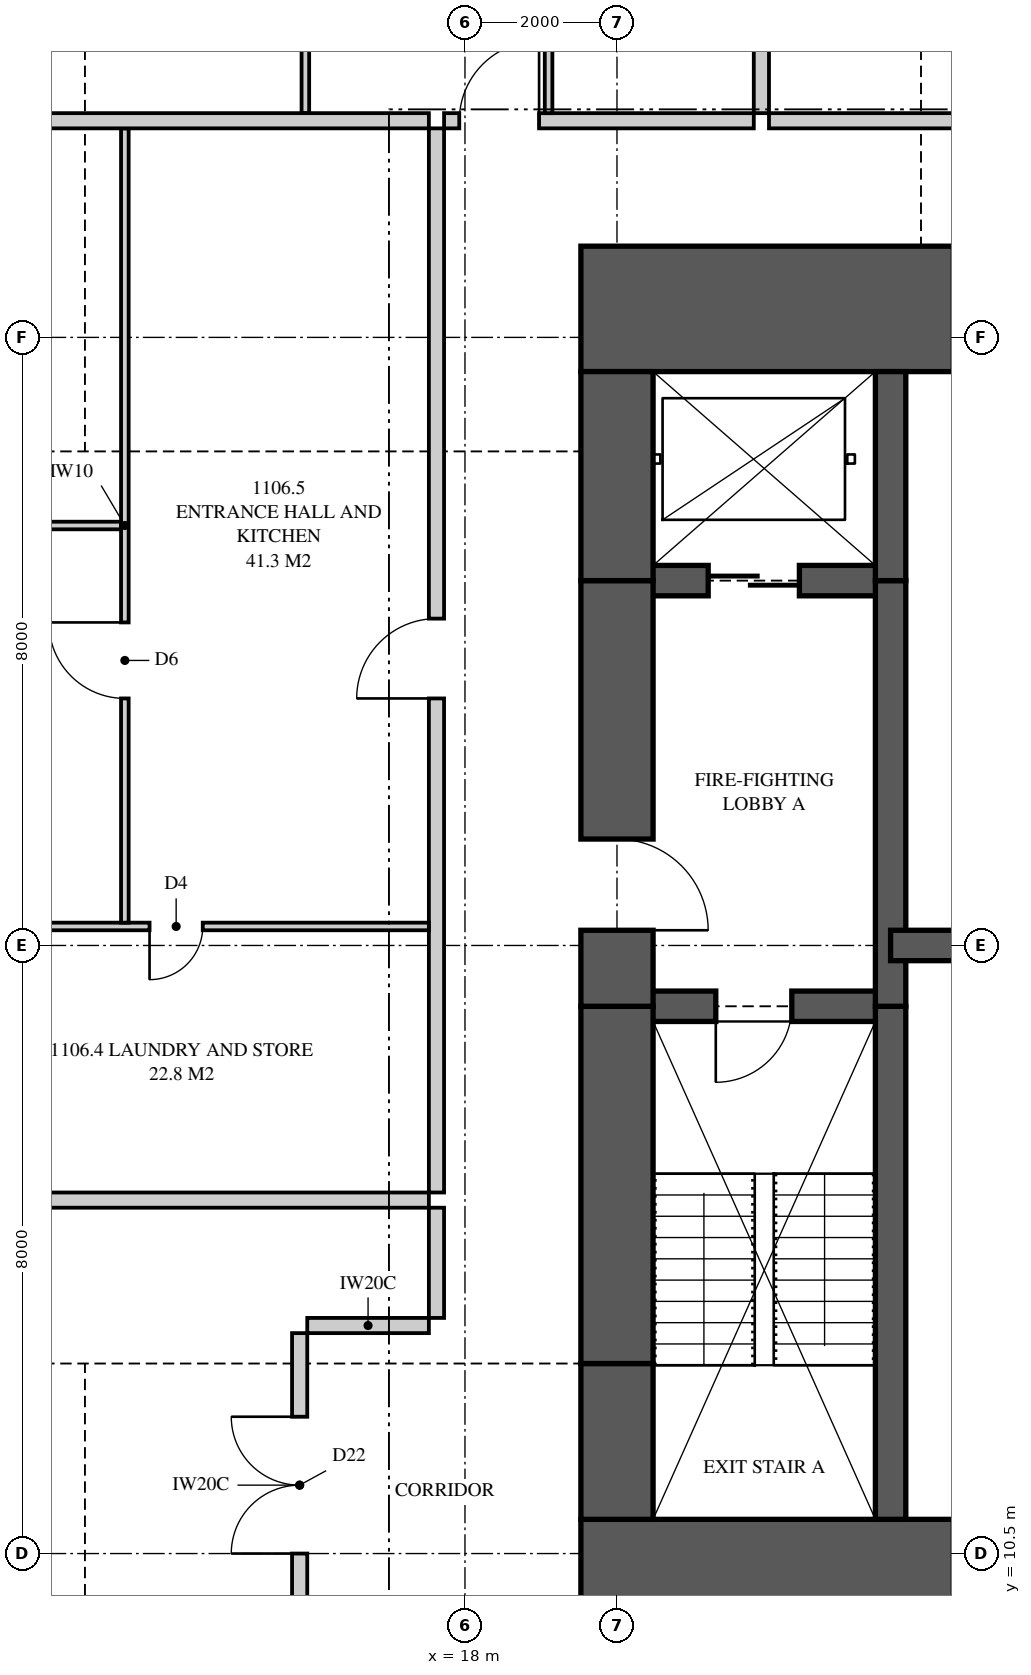
"""IFC4 building model, lengths in metres.
Left out: names, types, materials, properties, quantities, classifications, styles, units other than length and angle.
Written with IfcOpenShell. Run it as: python <this file> out.ifc"""

import sys

from ifc_helpers import new_model, si_unit, direction, frame, frame_2d, origin, place, context, subcontext, project, spatial, polyline, rectangle, outline, extrude, element, fill, save


model = new_model("IFC4")
c1 = context("Model", 3, precision=1e-05, world=origin(), true_north=direction((0.0, 1.0)))
c2 = subcontext(c1, "Body", "Model", "MODEL_VIEW")
j1 = project(units=[si_unit("LENGTHUNIT", "METRE"), si_unit("PLANEANGLEUNIT", "RADIAN")], contexts=[c1])
p1 = place(None, origin())
s1 = spatial("IfcSite", under=j1, at=p1, CompositionType="ELEMENT")
p2 = place(p1, origin())
s2 = spatial("IfcBuilding", under=s1, at=p2, CompositionType="ELEMENT")
p3 = place(p2, frame((0.0, 0.0, 44.45)))
s3 = spatial("IfcBuildingStorey", under=s2, at=p3, CompositionType="ELEMENT", Elevation=44.45)
p4 = place(p3, frame((19.525, 10.125, 0.0), z_axis=(0.0, 0.0, 1.0), x_axis=(1.0, 0.0, 0.0)))
e1 = element("IfcWall", 1, at=p4, inside=s3, PredefinedType="SHEAR", context=c2, shape_type="SweptSolid", body=[
    extrude(rectangle(XDim=6.475, YDim=1.65, at=frame_2d((3.238, 0.0))), origin(), (0.0, 0.0, 1.0), 3.35),
])
p5 = place(p4, frame((4.9, 0.0, 0.0)))
e2 = element("IfcOpeningElement", 2, at=p5, cuts=e1, PredefinedType="OPENING", context=c2, shape_type="SweptSolid", body=[
    extrude(rectangle(XDim=0.75, YDim=2.1, at=frame_2d((0.375, 1.05))), frame((0.0, 0.835, 0.0), z_axis=(0.0, -1.0, 0.0), x_axis=(1.0, 0.0, 0.0)), (0.0, 0.0, 1.0), 1.67),
])
p6 = place(p3, frame((26.0, 26.875, 0.0), z_axis=(0.0, 0.0, 1.0), x_axis=(-1.0, 0.0, 0.0)))
e3 = element("IfcWall", 3, at=p6, inside=s3, PredefinedType="SHEAR", context=c2, shape_type="SweptSolid", body=[
    extrude(rectangle(XDim=6.475, YDim=1.65, at=frame_2d((3.238, 0.0))), origin(), (0.0, 0.0, 1.0), 3.35),
])
p7 = place(p6, frame((0.825, 0.0, 0.0)))
e4 = element("IfcOpeningElement", 4, at=p7, cuts=e3, PredefinedType="OPENING", context=c2, shape_type="SweptSolid", body=[
    extrude(rectangle(XDim=0.75, YDim=2.1, at=frame_2d((0.375, 1.05))), frame((0.0, 0.835, 0.0), z_axis=(0.0, -1.0, 0.0), x_axis=(1.0, 0.0, 0.0)), (0.0, 0.0, 1.0), 1.67),
])
p8 = place(p3, frame((20.0, 26.05, 0.0), z_axis=(0.0, 0.0, 1.0), x_axis=(0.0, -1.0, 0.0)))
e5 = element("IfcWall", 5, at=p8, inside=s3, PredefinedType="SHEAR", context=c2, shape_type="SweptSolid", body=[
    extrude(rectangle(XDim=2.75, YDim=0.95, at=frame_2d((1.375, 0.0))), origin(), (0.0, 0.0, 1.0), 3.35),
])
p9 = place(p3, frame((20.0, 23.3, 0.0), z_axis=(0.0, 0.0, 1.0), x_axis=(0.0, -1.0, 0.0)))
e6 = element("IfcWall", 6, at=p9, inside=s3, PredefinedType="SHEAR", context=c2, shape_type="SweptSolid", body=[
    extrude(rectangle(XDim=5.6, YDim=0.95, at=frame_2d((2.8, 0.0))), origin(), (0.0, 0.0, 1.0), 3.35),
])
p10 = place(p9, frame((3.4, 0.0, 0.0)))
e7 = element("IfcOpeningElement", 7, at=p10, cuts=e6, PredefinedType="OPENING", context=c2, shape_type="SweptSolid", body=[
    extrude(rectangle(XDim=1.2, YDim=2.2, at=frame_2d((0.6, 1.1))), frame((0.0, 0.485, 0.0), z_axis=(0.0, -1.0, 0.0), x_axis=(1.0, 0.0, 0.0)), (0.0, 0.0, 1.0), 0.97),
])
p11 = place(p3, frame((20.0, 17.7, 0.0), z_axis=(0.0, 0.0, 1.0), x_axis=(0.0, -1.0, 0.0)))
e8 = element("IfcWall", 8, at=p11, inside=s3, PredefinedType="SHEAR", context=c2, shape_type="SweptSolid", body=[
    extrude(rectangle(XDim=4.7, YDim=0.95, at=frame_2d((2.35, 0.0))), origin(), (0.0, 0.0, 1.0), 3.35),
])
p12 = place(p3, frame((20.0, 13.0, 0.0), z_axis=(0.0, 0.0, 1.0), x_axis=(0.0, -1.0, 0.0)))
e9 = element("IfcWall", 9, at=p12, inside=s3, PredefinedType="SHEAR", context=c2, shape_type="SweptSolid", body=[
    extrude(rectangle(XDim=2.05, YDim=0.95, at=frame_2d((1.025, 0.0))), origin(), (0.0, 0.0, 1.0), 3.35),
])
p13 = place(p3, frame((23.6, 10.95, 0.0), z_axis=(0.0, 0.0, 1.0), x_axis=(0.0, 1.0, 0.0)))
e10 = element("IfcWall", 10, at=p13, inside=s3, PredefinedType="SHEAR", context=c2, shape_type="SweptSolid", body=[
    extrude(rectangle(XDim=6.75, YDim=0.4, at=frame_2d((3.375, 0.0))), origin(), (0.0, 0.0, 1.0), 3.35),
])
p14 = place(p3, frame((23.6, 17.7, 0.0), z_axis=(0.0, 0.0, 1.0), x_axis=(0.0, 1.0, 0.0)))
e11 = element("IfcWall", 11, at=p14, inside=s3, PredefinedType="SHEAR", context=c2, shape_type="SweptSolid", body=[
    extrude(rectangle(XDim=5.6, YDim=0.4, at=frame_2d((2.8, 0.0))), origin(), (0.0, 0.0, 1.0), 3.35),
])
p15 = place(p3, frame((23.6, 23.3, 0.0), z_axis=(0.0, 0.0, 1.0), x_axis=(0.0, 1.0, 0.0)))
e12 = element("IfcWall", 12, at=p15, inside=s3, PredefinedType="SHEAR", context=c2, shape_type="SweptSolid", body=[
    extrude(rectangle(XDim=2.75, YDim=0.4, at=frame_2d((1.375, 0.0))), origin(), (0.0, 0.0, 1.0), 3.35),
])
p16 = place(p3, frame((20.0, 17.7, 0.0), z_axis=(0.0, 0.0, 1.0), x_axis=(1.0, 0.0, 0.0)))
e13 = element("IfcWall", 13, at=p16, inside=s3, PredefinedType="SHEAR", context=c2, shape_type="SweptSolid", body=[
    extrude(rectangle(XDim=3.6, YDim=0.4, at=frame_2d((1.8, 0.0))), origin(), (0.0, 0.0, 1.0), 3.35),
])
p17 = place(p16, frame((1.3, 0.0, 0.0)))
e14 = element("IfcOpeningElement", 14, at=p17, cuts=e13, PredefinedType="OPENING", context=c2, shape_type="SweptSolid", body=[
    extrude(rectangle(XDim=1.0, YDim=2.1, at=frame_2d((0.5, 1.05))), frame((0.0, 0.21, 0.0), z_axis=(0.0, -1.0, 0.0), x_axis=(1.0, 0.0, 0.0)), (0.0, 0.0, 1.0), 0.42),
])
p18 = place(p3, frame((20.0, 23.3, 0.0), z_axis=(0.0, 0.0, 1.0), x_axis=(1.0, 0.0, 0.0)))
e15 = element("IfcWall", 15, at=p18, inside=s3, PredefinedType="SHEAR", context=c2, shape_type="SweptSolid", body=[
    extrude(rectangle(XDim=3.6, YDim=0.4, at=frame_2d((1.8, 0.0))), origin(), (0.0, 0.0, 1.0), 3.35),
])
p19 = place(p18, frame((1.2, 0.0, 0.0)))
e16 = element("IfcOpeningElement", 16, at=p19, cuts=e15, PredefinedType="OPENING", context=c2, shape_type="SweptSolid", body=[
    extrude(rectangle(XDim=1.2, YDim=2.1, at=frame_2d((0.6, 1.05))), frame((0.0, 0.21, 0.0), z_axis=(0.0, -1.0, 0.0), x_axis=(1.0, 0.0, 0.0)), (0.0, 0.0, 1.0), 0.42),
])
p20 = place(p3, frame((23.6, 18.5, 0.0), z_axis=(0.0, 0.0, 1.0), x_axis=(1.0, 0.0, 0.0)))
e17 = element("IfcWall", 17, at=p20, inside=s3, PredefinedType="SHEAR", context=c2, shape_type="SweptSolid", body=[
    extrude(rectangle(XDim=2.4, YDim=0.4, at=frame_2d((1.2, 0.0))), origin(), (0.0, 0.0, 1.0), 3.35),
])
p21 = place(p3, frame((21.9, 37.825, 0.0), z_axis=(0.0, 0.0, 1.0), x_axis=(0.0, -1.0, 0.0)))
e18 = element("IfcWall", 18, at=p21, inside=s3, PredefinedType="PARTITIONING", context=c2, shape_type="SweptSolid", body=[
    extrude(outline(polyline([(0.529, 2.15), (0.0, 2.15), (0.0, 0.0), (0.529, 0.0), (0.529, 0.056), (1.021, 0.056), (1.021, 0.0), (8.375, 0.0), (8.375, 3.11), (1.685, 3.11), (1.685, 2.15), (1.021, 2.15), (1.021, 2.094), (0.529, 2.094), (0.529, 2.15)])), frame((0.0, 0.1, 0.0), z_axis=(0.0, -1.0, 0.0), x_axis=(1.0, 0.0, 0.0)), (0.0, 0.0, 1.0), 0.2),
])
p22 = place(p3, frame((17.725, 29.35, 0.0), z_axis=(0.0, 0.0, 1.0), x_axis=(1.0, 0.0, 0.0)))
e19 = element("IfcWall", 19, at=p22, inside=s3, PredefinedType="PARTITIONING", context=c2, shape_type="SweptSolid", body=[
    extrude(rectangle(XDim=4.075, YDim=0.2, at=frame_2d((2.038, 0.0))), origin(), (0.0, 0.0, 1.0), 3.11),
])
p23 = place(p22, frame((0.2, 0.0, 0.0)))
e20 = element("IfcOpeningElement", 20, at=p23, cuts=e19, PredefinedType="OPENING", context=c2, shape_type="SweptSolid", body=[
    extrude(rectangle(XDim=1.05, YDim=2.2, at=frame_2d((0.525, 1.1))), frame((0.0, 0.11, 0.0), z_axis=(0.0, -1.0, 0.0), x_axis=(1.0, 0.0, 0.0)), (0.0, 0.0, 1.0), 0.22),
])
p24 = place(p3, frame((19.1, 32.4, 0.0), z_axis=(0.0, 0.0, 1.0), x_axis=(0.0, -1.0, 0.0)))
e21 = element("IfcWall", 21, at=p24, inside=s3, PredefinedType="PARTITIONING", context=c2, shape_type="SweptSolid", body=[
    extrude(rectangle(XDim=2.95, YDim=0.1, at=frame_2d((1.475, 0.0))), origin(), (0.0, 0.0, 1.0), 3.11),
])
p25 = place(p3, frame((15.9, 37.825, 0.0), z_axis=(0.0, 0.0, 1.0), x_axis=(0.0, -1.0, 0.0)))
e22 = element("IfcWall", 22, at=p25, inside=s3, PredefinedType="PARTITIONING", context=c2, shape_type="SweptSolid", body=[
    extrude(outline(polyline([(0.0, 0.0), (8.375, 0.0), (8.375, 3.11), (1.635, 3.11), (1.635, 2.15), (0.0, 2.15), (0.0, 3.11), (0.0, 0.0)])), frame((0.0, 0.05, 0.0), z_axis=(0.0, -1.0, 0.0), x_axis=(1.0, 0.0, 0.0)), (0.0, 0.0, 1.0), 0.1),
])
p26 = place(p25, frame((3.688, 0.0, 0.0)))
e23 = element("IfcOpeningElement", 23, at=p26, cuts=e22, PredefinedType="OPENING", context=c2, shape_type="SweptSolid", body=[
    extrude(rectangle(XDim=1.0, YDim=2.1, at=frame_2d((0.5, 1.05))), frame((0.0, 0.06, 0.0), z_axis=(0.0, -1.0, 0.0), x_axis=(1.0, 0.0, 0.0)), (0.0, 0.0, 1.0), 0.12),
])
p27 = place(p3, frame((22.0, 29.35, 0.0), z_axis=(0.0, 0.0, 1.0), x_axis=(1.0, 0.0, 0.0)))
e24 = element("IfcWall", 24, at=p27, inside=s3, PredefinedType="PARTITIONING", context=c2, shape_type="SweptSolid", body=[
    extrude(outline(polyline([(0.0, 0.0), (5.9, 0.0), (5.9, 3.11), (2.337, 3.11), (2.337, 2.541), (1.663, 2.541), (1.663, 3.11), (0.0, 3.11), (0.0, 0.0)])), frame((0.0, 0.1, 0.0), z_axis=(0.0, -1.0, 0.0), x_axis=(1.0, 0.0, 0.0)), (0.0, 0.0, 1.0), 0.2),
])
p28 = place(p3, frame((2.0, 29.35, 0.0), z_axis=(0.0, 0.0, 1.0), x_axis=(1.0, 0.0, 0.0)))
e25 = element("IfcWall", 25, at=p28, inside=s3, PredefinedType="PARTITIONING", context=c2, shape_type="SweptSolid", body=[
    extrude(outline(polyline([(0.0, 0.0), (15.525, 0.0), (15.525, 3.11), (11.337, 3.11), (11.337, 2.541), (10.663, 2.541), (10.663, 3.11), (9.51, 3.11), (9.51, 2.51), (6.89, 2.51), (6.89, 3.11), (2.969, 3.11), (2.969, 2.541), (2.577, 2.541), (2.577, 2.15), (0.733, 2.15), (0.733, 3.11), (0.0, 3.11), (0.0, 0.0)])), frame((0.0, 0.1, 0.0), z_axis=(0.0, -1.0, 0.0), x_axis=(1.0, 0.0, 0.0)), (0.0, 0.0, 1.0), 0.2),
])
p29 = place(p3, frame((2.175, 15.15, 0.0), z_axis=(0.0, 0.0, 1.0), x_axis=(1.0, 0.0, 0.0)))
e26 = element("IfcWall", 26, at=p29, inside=s3, PredefinedType="PARTITIONING", context=c2, shape_type="SweptSolid", body=[
    extrude(outline(polyline([(0.529, 2.15), (0.0, 2.15), (0.0, 0.0), (0.529, 0.0), (0.529, 0.021), (1.021, 0.021), (1.021, 0.0), (15.35, 0.0), (15.35, 3.11), (9.335, 3.11), (9.335, 2.51), (6.715, 2.51), (6.715, 3.11), (1.685, 3.11), (1.685, 2.15), (1.021, 2.15), (1.021, 2.129), (0.529, 2.129), (0.529, 2.15)])), frame((0.0, 0.1, 0.0), z_axis=(0.0, -1.0, 0.0), x_axis=(1.0, 0.0, 0.0)), (0.0, 0.0, 1.0), 0.2),
])
p30 = place(p3, frame((17.625, 15.25, 0.0), z_axis=(0.0, 0.0, 1.0), x_axis=(0.0, 1.0, 0.0)))
e27 = element("IfcWall", 27, at=p30, inside=s3, PredefinedType="PARTITIONING", context=c2, shape_type="SweptSolid", body=[
    extrude(outline(polyline([(0.0, 0.0), (14.0, 0.0), (14.0, 3.11), (10.087, 3.11), (10.087, 2.541), (9.413, 2.541), (9.413, 3.11), (0.0, 3.11), (0.0, 0.0)])), frame((0.0, 0.1, 0.0), z_axis=(0.0, -1.0, 0.0), x_axis=(1.0, 0.0, 0.0)), (0.0, 0.0, 1.0), 0.2),
])
p31 = place(p30, frame((6.5, 0.0, 0.0)))
e28 = element("IfcOpeningElement", 28, at=p31, cuts=e27, PredefinedType="OPENING", context=c2, shape_type="SweptSolid", body=[
    extrude(rectangle(XDim=1.05, YDim=2.2, at=frame_2d((0.525, 1.1))), frame((0.0, 0.11, 0.0), z_axis=(0.0, -1.0, 0.0), x_axis=(1.0, 0.0, 0.0)), (0.0, 0.0, 1.0), 0.22),
])
p32 = place(p3, frame((2.175, 18.75, 0.0), z_axis=(0.0, 0.0, 1.0), x_axis=(1.0, 0.0, 0.0)))
e29 = element("IfcWall", 29, at=p32, inside=s3, PredefinedType="PARTITIONING", context=c2, shape_type="SweptSolid", body=[
    extrude(outline(polyline([(0.0, 0.0), (15.35, 0.0), (15.35, 3.11), (9.285, 3.11), (9.285, 2.51), (6.765, 2.51), (6.765, 3.11), (1.635, 3.11), (1.635, 2.15), (0.0, 2.15), (0.0, 3.11), (0.0, 0.0)])), frame((0.0, 0.05, 0.0), z_axis=(0.0, -1.0, 0.0), x_axis=(1.0, 0.0, 0.0)), (0.0, 0.0, 1.0), 0.1),
])
p33 = place(p32, frame((4.85, 0.0, 0.0)))
e30 = element("IfcOpeningElement", 30, at=p33, cuts=e29, PredefinedType="OPENING", context=c2, shape_type="SweptSolid", body=[
    extrude(rectangle(XDim=0.9, YDim=2.1, at=frame_2d((0.45, 1.05))), frame((0.0, 0.06, 0.0), z_axis=(0.0, -1.0, 0.0), x_axis=(1.0, 0.0, 0.0)), (0.0, 0.0, 1.0), 0.12),
])
p34 = place(p32, frame((11.675, 0.0, 0.0)))
e31 = element("IfcOpeningElement", 31, at=p34, cuts=e29, PredefinedType="OPENING", context=c2, shape_type="SweptSolid", body=[
    extrude(rectangle(XDim=0.7, YDim=2.1, at=frame_2d((0.35, 1.05))), frame((0.0, 0.06, 0.0), z_axis=(0.0, -1.0, 0.0), x_axis=(1.0, 0.0, 0.0)), (0.0, 0.0, 1.0), 0.12),
])
p35 = place(p3, frame((13.525, 18.8, 0.0), z_axis=(0.0, 0.0, 1.0), x_axis=(0.0, 1.0, 0.0)))
e32 = element("IfcWall", 32, at=p35, inside=s3, PredefinedType="PARTITIONING", context=c2, shape_type="SweptSolid", body=[
    extrude(outline(polyline([(0.0, 0.0), (10.45, 0.0), (10.45, 3.11), (6.487, 3.11), (6.487, 2.541), (5.913, 2.541), (5.913, 3.11), (0.0, 3.11), (0.0, 0.0)])), frame((0.0, 0.05, 0.0), z_axis=(0.0, -1.0, 0.0), x_axis=(1.0, 0.0, 0.0)), (0.0, 0.0, 1.0), 0.1),
])
p36 = place(p35, frame((2.95, 0.0, 0.0)))
e33 = element("IfcOpeningElement", 33, at=p36, cuts=e32, PredefinedType="OPENING", context=c2, shape_type="SweptSolid", body=[
    extrude(rectangle(XDim=1.0, YDim=2.1, at=frame_2d((0.5, 1.05))), frame((0.0, 0.06, 0.0), z_axis=(0.0, -1.0, 0.0), x_axis=(1.0, 0.0, 0.0)), (0.0, 0.0, 1.0), 0.12),
])
p37 = place(p3, frame((2.175, 24.025, 0.0), z_axis=(0.0, 0.0, 1.0), x_axis=(1.0, 0.0, 0.0)))
e34 = element("IfcWall", 34, at=p37, inside=s3, PredefinedType="PARTITIONING", context=c2, shape_type="SweptSolid", body=[
    extrude(outline(polyline([(0.529, 2.15), (0.0, 2.15), (0.0, 0.0), (0.529, 0.0), (0.529, 0.798), (1.021, 0.798), (1.021, 0.0), (11.3, 0.0), (11.3, 3.11), (9.285, 3.11), (9.285, 2.51), (6.765, 2.51), (6.765, 3.11), (1.635, 3.11), (1.635, 2.15), (1.021, 2.15), (1.021, 1.352), (0.529, 1.352), (0.529, 2.15)])), frame((0.0, 0.05, 0.0), z_axis=(0.0, -1.0, 0.0), x_axis=(1.0, 0.0, 0.0)), (0.0, 0.0, 1.0), 0.1),
])
p38 = place(p37, frame((5.15, 0.0, 0.0)))
e35 = element("IfcOpeningElement", 35, at=p38, cuts=e34, PredefinedType="OPENING", context=c2, shape_type="SweptSolid", body=[
    extrude(rectangle(XDim=1.0, YDim=2.1, at=frame_2d((0.5, 1.05))), frame((0.0, 0.06, 0.0), z_axis=(0.0, -1.0, 0.0), x_axis=(1.0, 0.0, 0.0)), (0.0, 0.0, 1.0), 0.12),
])
p39 = place(p3, frame((17.625, 13.6, 0.0), z_axis=(0.0, 0.0, 1.0), x_axis=(0.0, 1.0, 0.0)))
e36 = element("IfcWall", 36, at=p39, inside=s3, PredefinedType="PARTITIONING", context=c2, shape_type="SweptSolid", body=[
    extrude(rectangle(XDim=1.45, YDim=0.2, at=frame_2d((0.725, 0.0))), origin(), (0.0, 0.0, 1.0), 3.11),
])
p40 = place(p3, frame((15.825, 9.4, 0.0), z_axis=(0.0, 0.0, 1.0), x_axis=(0.0, 1.0, 0.0)))
e37 = element("IfcWall", 37, at=p40, inside=s3, PredefinedType="PARTITIONING", context=c2, shape_type="SweptSolid", body=[
    extrude(outline(polyline([(0.0, 0.0), (4.0, 0.0), (4.0, 3.11), (3.937, 3.11), (3.937, 2.541), (3.263, 2.541), (3.263, 3.11), (0.0, 3.11), (0.0, 0.0)])), frame((0.0, 0.1, 0.0), z_axis=(0.0, -1.0, 0.0), x_axis=(1.0, 0.0, 0.0)), (0.0, 0.0, 1.0), 0.2),
])
p41 = place(p40, frame((1.1, 0.0, 0.0)))
e38 = element("IfcOpeningElement", 38, at=p41, cuts=e37, PredefinedType="OPENING", context=c2, shape_type="SweptSolid", body=[
    extrude(rectangle(XDim=1.8, YDim=2.1, at=frame_2d((0.9, 1.05))), frame((0.0, 0.11, 0.0), z_axis=(0.0, -1.0, 0.0), x_axis=(1.0, 0.0, 0.0)), (0.0, 0.0, 1.0), 0.22),
])
p42 = place(p3, frame((17.525, 13.5, 0.0), z_axis=(0.0, 0.0, 1.0), x_axis=(-1.0, 0.0, 0.0)))
e39 = element("IfcWall", 39, at=p42, inside=s3, PredefinedType="PARTITIONING", context=c2, shape_type="SweptSolid", body=[
    extrude(rectangle(XDim=1.6, YDim=0.2, at=frame_2d((0.8, 0.0))), origin(), (0.0, 0.0, 1.0), 3.11),
])
p43 = place(p23, origin())
e40 = element("IfcDoor", 40, at=p43, inside=s3, OperationType="SINGLE_SWING_RIGHT", PredefinedType="DOOR", context=c2, shape_type="SweptSolid", body=[
    extrude(rectangle(XDim=1.05, YDim=2.2, at=frame_2d((0.525, 1.1))), frame((0.0, 0.025, 0.0), z_axis=(0.0, -1.0, 0.0), x_axis=(1.0, 0.0, 0.0)), (0.0, 0.0, 1.0), 0.05),
])
fill(e20, e40)
p44 = place(p41, origin())
e41 = element("IfcDoor", 41, at=p44, inside=s3, OperationType="DOUBLE_DOOR_SINGLE_SWING", PredefinedType="DOOR", context=c2, shape_type="SweptSolid", body=[
    extrude(rectangle(XDim=1.8, YDim=2.1, at=frame_2d((0.9, 1.05))), frame((0.0, 0.025, 0.0), z_axis=(0.0, -1.0, 0.0), x_axis=(1.0, 0.0, 0.0)), (0.0, 0.0, 1.0), 0.05),
])
fill(e38, e41)
p45 = place(p31, origin())
e42 = element("IfcDoor", 42, at=p45, inside=s3, OperationType="SINGLE_SWING_LEFT", PredefinedType="DOOR", context=c2, shape_type="SweptSolid", body=[
    extrude(rectangle(XDim=1.05, YDim=2.2, at=frame_2d((0.525, 1.1))), frame((0.0, 0.025, 0.0), z_axis=(0.0, -1.0, 0.0), x_axis=(1.0, 0.0, 0.0)), (0.0, 0.0, 1.0), 0.05),
])
fill(e28, e42)
p46 = place(p34, frame((0.7, 0.0, 0.0), z_axis=(0.0, 0.0, 1.0), x_axis=(-1.0, 0.0, 0.0)))
e43 = element("IfcDoor", 43, at=p46, inside=s3, OperationType="SINGLE_SWING_RIGHT", PredefinedType="DOOR", context=c2, shape_type="SweptSolid", body=[
    extrude(rectangle(XDim=0.7, YDim=2.1, at=frame_2d((0.35, 1.05))), frame((0.0, 0.025, 0.0), z_axis=(0.0, -1.0, 0.0), x_axis=(1.0, 0.0, 0.0)), (0.0, 0.0, 1.0), 0.05),
])
fill(e31, e43)
p47 = place(p36, origin())
e44 = element("IfcDoor", 44, at=p47, inside=s3, OperationType="SINGLE_SWING_RIGHT", PredefinedType="DOOR", context=c2, shape_type="SweptSolid", body=[
    extrude(rectangle(XDim=1.0, YDim=2.1, at=frame_2d((0.5, 1.05))), frame((0.0, 0.025, 0.0), z_axis=(0.0, -1.0, 0.0), x_axis=(1.0, 0.0, 0.0)), (0.0, 0.0, 1.0), 0.05),
])
fill(e33, e44)
p48 = place(p17, frame((1.0, 0.0, 0.0), z_axis=(0.0, 0.0, 1.0), x_axis=(-1.0, 0.0, 0.0)))
e45 = element("IfcDoor", 45, at=p48, inside=s3, OperationType="SINGLE_SWING_RIGHT", PredefinedType="DOOR", context=c2, shape_type="SweptSolid", body=[
    extrude(rectangle(XDim=1.0, YDim=2.1, at=frame_2d((0.5, 1.05))), frame((0.0, 0.025, 0.0), z_axis=(0.0, -1.0, 0.0), x_axis=(1.0, 0.0, 0.0)), (0.0, 0.0, 1.0), 0.05),
])
fill(e14, e45)
p49 = place(p10, origin())
e46 = element("IfcDoor", 46, at=p49, inside=s3, OperationType="SINGLE_SWING_RIGHT", PredefinedType="DOOR", context=c2, shape_type="SweptSolid", body=[
    extrude(rectangle(XDim=1.2, YDim=2.2, at=frame_2d((0.6, 1.1))), frame((0.0, 0.025, 0.0), z_axis=(0.0, -1.0, 0.0), x_axis=(1.0, 0.0, 0.0)), (0.0, 0.0, 1.0), 0.05),
])
fill(e7, e46)
p50 = place(p19, origin())
e47 = element("IfcDoor", 47, at=p50, inside=s3, OperationType="SLIDING_TO_LEFT", PredefinedType="DOOR", context=c2, shape_type="SweptSolid", body=[
    extrude(rectangle(XDim=1.2, YDim=2.1, at=frame_2d((0.6, 1.05))), frame((0.0, 0.025, 0.0), z_axis=(0.0, -1.0, 0.0), x_axis=(1.0, 0.0, 0.0)), (0.0, 0.0, 1.0), 0.05),
])
fill(e16, e47)
save(model, sys.argv[1])
